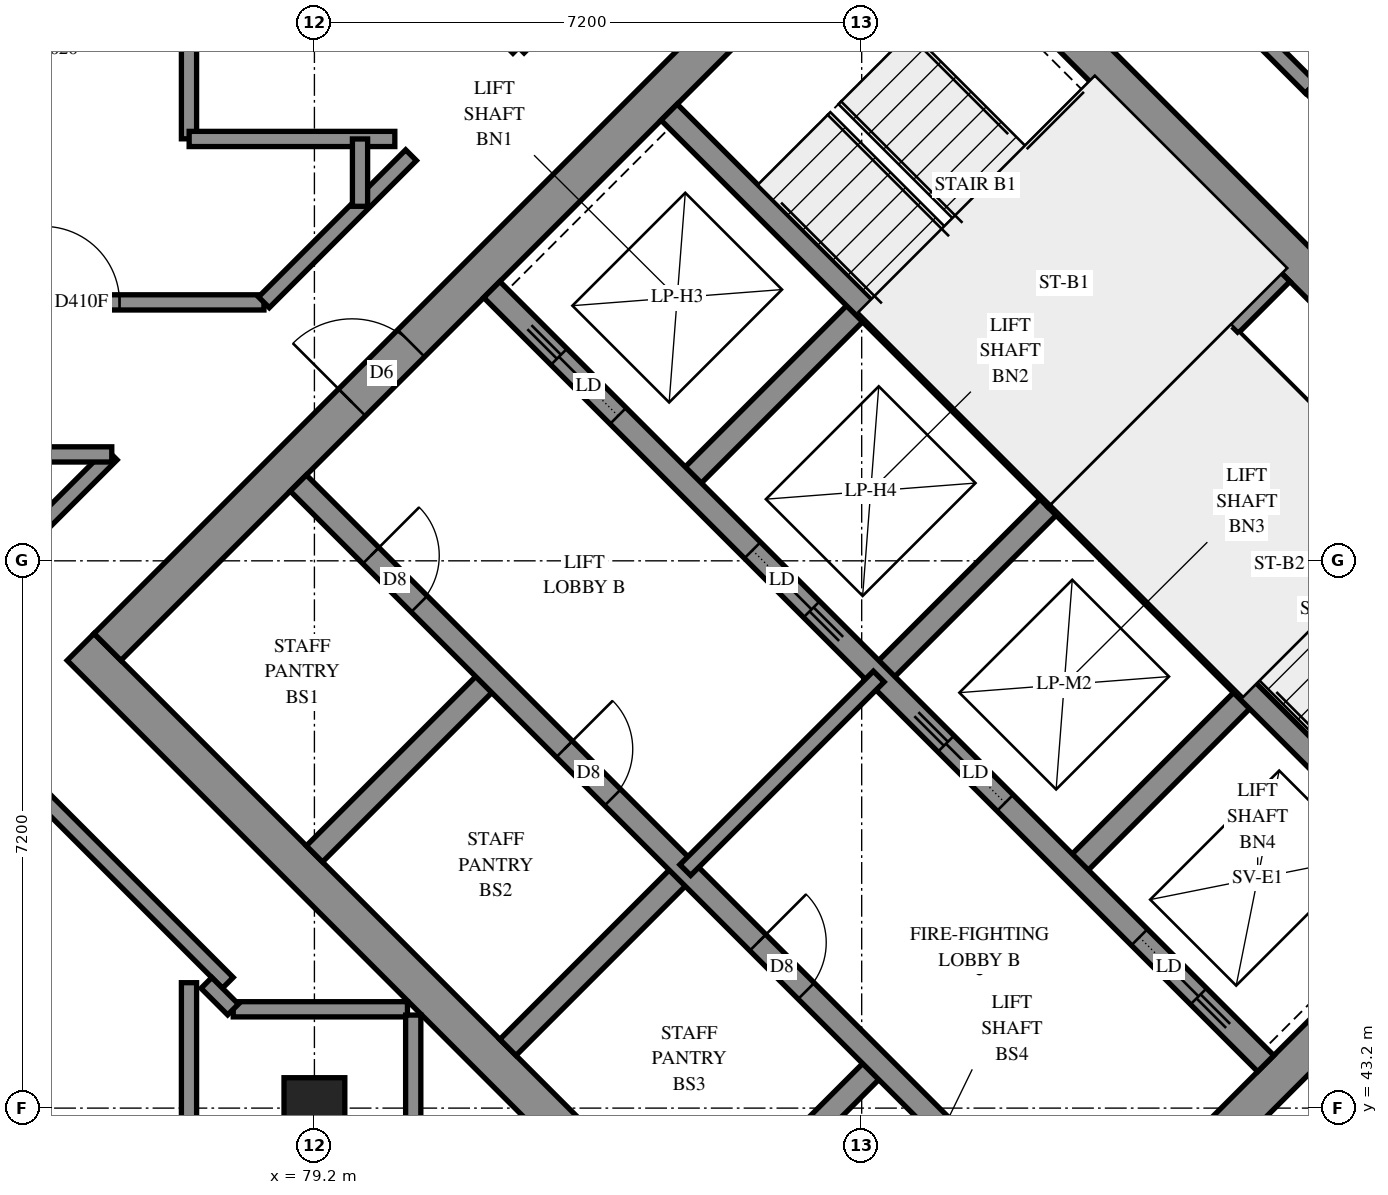
"""IFC4 building model, lengths in metres.
Left out: names, types, materials, properties, quantities, classifications, styles, units other than length and angle.
Written with IfcOpenShell. Run it as: python <this file> out.ifc"""

import sys

from ifc_helpers import new_model, si_unit, direction, frame, frame_2d, origin, origin_2d, place, context, subcontext, project, spatial, rectangle, extrude, element, fill, save


model = new_model("IFC4")
c1 = context("Model", 3, precision=1e-05, world=origin(), true_north=direction((0.0, 1.0)))
c2 = subcontext(c1, "Body", "Model", "MODEL_VIEW")
j1 = project(units=[si_unit("LENGTHUNIT", "METRE"), si_unit("PLANEANGLEUNIT", "RADIAN")], contexts=[c1])
p1 = place(None, origin())
s1 = spatial("IfcSite", under=j1, at=p1, CompositionType="ELEMENT")
p2 = place(p1, origin())
s2 = spatial("IfcBuilding", under=s1, at=p2, CompositionType="ELEMENT")
p3 = place(p2, frame((0.0, 0.0, 227.0)))
s3 = spatial("IfcBuildingStorey", under=s2, at=p3, CompositionType="ELEMENT", Elevation=227.0)
p4 = place(p3, frame((79.2, 43.2, 0.0), z_axis=(0.0, 0.0, 1.0), x_axis=(1.0, 0.0, 0.0)))
e1 = element("IfcColumn", 1, at=p4, inside=s3, PredefinedType="COLUMN", context=c2, shape_type="SweptSolid", body=[
    extrude(rectangle(XDim=0.8, YDim=0.8, at=origin_2d()), origin(), (0.0, 0.0, 1.0), 3.1),
])
p5 = place(p3, frame((76.124, 49.267, -0.3), z_axis=(0.0, 0.0, 1.0), x_axis=(0.7071067812, -0.7071067812, 0.0)))
e2 = element("IfcWall", 2, at=p5, inside=s3, PredefinedType="SHEAR", context=c2, shape_type="SweptSolid", body=[
    extrude(rectangle(XDim=15.4, YDim=0.5, at=frame_2d((7.7, 0.0))), origin(), (0.0, 0.0, 1.0), 2.7),
])
p6 = place(p3, frame((86.66, 59.802, -0.3), z_axis=(0.0, 0.0, 1.0), x_axis=(0.7071067812, -0.7071067812, 0.0)))
e3 = element("IfcWall", 3, at=p6, inside=s3, PredefinedType="SHEAR", context=c2, shape_type="SweptSolid", body=[
    extrude(rectangle(XDim=15.4, YDim=0.5, at=frame_2d((7.7, 0.0))), origin(), (0.0, 0.0, 1.0), 2.7),
])
p7 = place(p6, frame((10.5, 0.0, 0.3)))
e4 = element("IfcOpeningElement", 4, at=p7, cuts=e3, PredefinedType="OPENING", context=c2, shape_type="SweptSolid", body=[
    extrude(rectangle(XDim=0.8, YDim=2.1, at=frame_2d((0.4, 1.05))), frame((0.0, 0.26, 0.0), z_axis=(0.0, -1.0, 0.0), x_axis=(1.0, 0.0, 0.0)), (0.0, 0.0, 1.0), 0.52),
])
p8 = place(p3, frame((76.478, 49.267, -0.3), z_axis=(0.0, 0.0, 1.0), x_axis=(0.7071067812, 0.7071067812, 0.0)))
e5 = element("IfcWall", 5, at=p8, inside=s3, PredefinedType="SHEAR", context=c2, shape_type="SweptSolid", body=[
    extrude(rectangle(XDim=14.4, YDim=0.5, at=frame_2d((7.2, 0.0))), origin(), (0.0, 0.0, 1.0), 2.7),
])
p9 = place(p8, frame((4.55, 0.0, 0.3)))
e6 = element("IfcOpeningElement", 6, at=p9, cuts=e5, PredefinedType="OPENING", context=c2, shape_type="SweptSolid", body=[
    extrude(rectangle(XDim=1.1, YDim=2.1, at=frame_2d((0.55, 1.05))), frame((0.0, 0.26, 0.0), z_axis=(0.0, -1.0, 0.0), x_axis=(1.0, 0.0, 0.0)), (0.0, 0.0, 1.0), 0.52),
])
p10 = place(p8, frame((11.35, 0.0, 0.3)))
e7 = element("IfcOpeningElement", 7, at=p10, cuts=e5, PredefinedType="OPENING", context=c2, shape_type="SweptSolid", body=[
    extrude(rectangle(XDim=1.1, YDim=2.1, at=frame_2d((0.55, 1.05))), frame((0.0, 0.26, 0.0), z_axis=(0.0, -1.0, 0.0), x_axis=(1.0, 0.0, 0.0)), (0.0, 0.0, 1.0), 0.52),
])
p11 = place(p3, frame((87.013, 38.731, -0.3), z_axis=(0.0, 0.0, 1.0), x_axis=(0.7071067812, 0.7071067812, 0.0)))
e8 = element("IfcWall", 8, at=p11, inside=s3, PredefinedType="SHEAR", context=c2, shape_type="SweptSolid", body=[
    extrude(rectangle(XDim=14.4, YDim=0.5, at=frame_2d((7.2, 0.0))), origin(), (0.0, 0.0, 1.0), 2.7),
])
p12 = place(p11, frame((4.55, 0.0, 0.3)))
e9 = element("IfcOpeningElement", 9, at=p12, cuts=e8, PredefinedType="OPENING", context=c2, shape_type="SweptSolid", body=[
    extrude(rectangle(XDim=1.1, YDim=2.1, at=frame_2d((0.55, 1.05))), frame((0.0, 0.26, 0.0), z_axis=(0.0, -1.0, 0.0), x_axis=(1.0, 0.0, 0.0)), (0.0, 0.0, 1.0), 0.52),
])
p13 = place(p11, frame((11.35, 0.0, 0.3)))
e10 = element("IfcOpeningElement", 10, at=p13, cuts=e8, PredefinedType="OPENING", context=c2, shape_type="SweptSolid", body=[
    extrude(rectangle(XDim=1.1, YDim=2.1, at=frame_2d((0.55, 1.05))), frame((0.0, 0.26, 0.0), z_axis=(0.0, -1.0, 0.0), x_axis=(1.0, 0.0, 0.0)), (0.0, 0.0, 1.0), 0.52),
])
for number, where, z_axis, x_axis in (
    (11, (79.2, 46.544, 0.0), (0.0, 0.0, 1.0), (0.707, 0.707, 0.0)),
    (12, (84.079, 51.423, 0.0), (0.0, 0.0, 1.0), (0.707, 0.707, 0.0)),
):
    element("IfcWall", number, at=place(p3, frame(where, z_axis=z_axis, x_axis=x_axis)), inside=s3, PredefinedType="SOLIDWALL", context=c2, shape_type="SweptSolid", body=[
        extrude(rectangle(XDim=3.3, YDim=0.3, at=frame_2d((1.65, 0.0))), origin(), (0.0, 0.0, 1.0), 3.1),
    ])
p14 = place(p3, frame((81.746, 43.999, 0.0), z_axis=(0.0, 0.0, 1.0), x_axis=(0.7071067812, 0.7071067812, 0.0)))
e13 = element("IfcWall", 13, at=p14, inside=s3, PredefinedType="SOLIDWALL", context=c2, shape_type="SweptSolid", body=[
    extrude(rectangle(XDim=3.3, YDim=0.3, at=frame_2d((1.65, 0.0))), origin(), (0.0, 0.0, 1.0), 3.1),
])
p15 = place(p3, frame((86.625, 48.878, 0.0), z_axis=(0.0, 0.0, 1.0), x_axis=(0.7071067812, 0.7071067812, 0.0)))
e14 = element("IfcWall", 14, at=p15, inside=s3, PredefinedType="SOLIDWALL", context=c2, shape_type="SweptSolid", body=[
    extrude(rectangle(XDim=3.3, YDim=0.3, at=frame_2d((1.65, 0.0))), origin(), (0.0, 0.0, 1.0), 3.1),
])
p16 = place(p3, frame((84.291, 41.453, 0.0), z_axis=(0.0, 0.0, 1.0), x_axis=(0.7071067812, 0.7071067812, 0.0)))
e15 = element("IfcWall", 15, at=p16, inside=s3, PredefinedType="SOLIDWALL", context=c2, shape_type="SweptSolid", body=[
    extrude(rectangle(XDim=3.3, YDim=0.3, at=frame_2d((1.65, 0.0))), origin(), (0.0, 0.0, 1.0), 3.1),
])
p17 = place(p3, frame((89.17, 46.332, 0.0), z_axis=(0.0, 0.0, 1.0), x_axis=(0.7071067812, 0.7071067812, 0.0)))
e16 = element("IfcWall", 16, at=p17, inside=s3, PredefinedType="SOLIDWALL", context=c2, shape_type="SweptSolid", body=[
    extrude(rectangle(XDim=3.3, YDim=0.3, at=frame_2d((1.65, 0.0))), origin(), (0.0, 0.0, 1.0), 3.1),
])
p18 = place(p3, frame((78.988, 51.423, 0.0), z_axis=(0.0, 0.0, 1.0), x_axis=(0.7071067812, -0.7071067812, 0.0)))
e17 = element("IfcWall", 17, at=p18, inside=s3, PredefinedType="SOLIDWALL", context=c2, shape_type="SweptSolid", body=[
    extrude(rectangle(XDim=14.4, YDim=0.3, at=frame_2d((7.2, 0.0))), origin(), (0.0, 0.0, 1.0), 3.1),
])
p19 = place(p18, frame((1.35, 0.0, 0.0)))
e18 = element("IfcOpeningElement", 18, at=p19, cuts=e17, PredefinedType="OPENING", context=c2, shape_type="SweptSolid", body=[
    extrude(rectangle(XDim=0.9, YDim=2.1, at=frame_2d((0.45, 1.05))), frame((0.0, 0.16, 0.0), z_axis=(0.0, -1.0, 0.0), x_axis=(1.0, 0.0, 0.0)), (0.0, 0.0, 1.0), 0.32),
])
p20 = place(p18, frame((4.95, 0.0, 0.0)))
e19 = element("IfcOpeningElement", 19, at=p20, cuts=e17, PredefinedType="OPENING", context=c2, shape_type="SweptSolid", body=[
    extrude(rectangle(XDim=0.9, YDim=2.1, at=frame_2d((0.45, 1.05))), frame((0.0, 0.16, 0.0), z_axis=(0.0, -1.0, 0.0), x_axis=(1.0, 0.0, 0.0)), (0.0, 0.0, 1.0), 0.32),
])
p21 = place(p18, frame((8.55, 0.0, 0.0)))
e20 = element("IfcOpeningElement", 20, at=p21, cuts=e17, PredefinedType="OPENING", context=c2, shape_type="SweptSolid", body=[
    extrude(rectangle(XDim=0.9, YDim=2.1, at=frame_2d((0.45, 1.05))), frame((0.0, 0.16, 0.0), z_axis=(0.0, -1.0, 0.0), x_axis=(1.0, 0.0, 0.0)), (0.0, 0.0, 1.0), 0.32),
])
p22 = place(p18, frame((12.05, 0.0, 0.0)))
e21 = element("IfcOpeningElement", 21, at=p22, cuts=e17, PredefinedType="OPENING", context=c2, shape_type="SweptSolid", body=[
    extrude(rectangle(XDim=1.1, YDim=2.1, at=frame_2d((0.55, 1.05))), frame((0.0, 0.16, 0.0), z_axis=(0.0, -1.0, 0.0), x_axis=(1.0, 0.0, 0.0)), (0.0, 0.0, 1.0), 0.32),
])
p23 = place(p3, frame((81.534, 53.969, 0.0), z_axis=(0.0, 0.0, 1.0), x_axis=(0.707103309, -0.7071102534, 0.0)))
e22 = element("IfcWall", 22, at=p23, inside=s3, PredefinedType="SOLIDWALL", context=c2, shape_type="SweptSolid", body=[
    extrude(rectangle(XDim=14.4, YDim=0.3, at=frame_2d((7.2, 0.0))), origin(), (0.0, 0.0, 1.0), 3.1),
])
p24 = place(p23, frame((1.25, 0.0, 0.0)))
e23 = element("IfcOpeningElement", 23, at=p24, cuts=e22, PredefinedType="OPENING", context=c2, shape_type="SweptSolid", body=[
    extrude(rectangle(XDim=1.1, YDim=2.1, at=frame_2d((0.55, 1.05))), frame((0.0, 0.16, 0.0), z_axis=(0.0, -1.0, 0.0), x_axis=(1.0, 0.0, 0.0)), (0.0, 0.0, 1.0), 0.32),
])
p25 = place(p23, frame((4.85, 0.0, 0.0)))
e24 = element("IfcOpeningElement", 24, at=p25, cuts=e22, PredefinedType="OPENING", context=c2, shape_type="SweptSolid", body=[
    extrude(rectangle(XDim=1.1, YDim=2.1, at=frame_2d((0.55, 1.05))), frame((0.0, 0.16, 0.0), z_axis=(0.0, -1.0, 0.0), x_axis=(1.0, 0.0, 0.0)), (0.0, 0.0, 1.0), 0.32),
])
p26 = place(p23, frame((8.45, 0.0, 0.0)))
e25 = element("IfcOpeningElement", 25, at=p26, cuts=e22, PredefinedType="OPENING", context=c2, shape_type="SweptSolid", body=[
    extrude(rectangle(XDim=1.1, YDim=2.1, at=frame_2d((0.55, 1.05))), frame((0.0, 0.16, 0.0), z_axis=(0.0, -1.0, 0.0), x_axis=(1.0, 0.0, 0.0)), (0.0, 0.0, 1.0), 0.32),
])
p27 = place(p23, frame((12.05, 0.0, 0.0)))
e26 = element("IfcOpeningElement", 26, at=p27, cuts=e22, PredefinedType="OPENING", context=c2, shape_type="SweptSolid", body=[
    extrude(rectangle(XDim=1.1, YDim=2.1, at=frame_2d((0.55, 1.05))), frame((0.0, 0.16, 0.0), z_axis=(0.0, -1.0, 0.0), x_axis=(1.0, 0.0, 0.0)), (0.0, 0.0, 1.0), 0.32),
])
for number, where, z_axis, x_axis in (
    (27, (83.867, 56.302, 0.0), (0.0, 0.0, 1.0), (0.707, -0.707, 0.0)),
    (28, (88.958, 51.211, 0.0), (0.0, 0.0, 1.0), (0.707, -0.707, 0.0)),
):
    element("IfcWall", number, at=place(p3, frame(where, z_axis=z_axis, x_axis=x_axis)), inside=s3, PredefinedType="SOLIDWALL", context=c2, shape_type="SweptSolid", body=[
        extrude(rectangle(XDim=7.2, YDim=0.3, at=frame_2d((3.6, 0.0))), origin(), (0.0, 0.0, 1.0), 3.1),
    ])
p28 = place(p3, frame((88.958, 51.211, 0.0), z_axis=(0.0, 0.0, 1.0), x_axis=(0.7071067812, 0.7071067812, 0.0)))
e29 = element("IfcWall", 29, at=p28, inside=s3, PredefinedType="SOLIDWALL", context=c2, shape_type="SweptSolid", body=[
    extrude(rectangle(XDim=4.2, YDim=0.3, at=frame_2d((2.1, 0.0))), origin(), (0.0, 0.0, 1.0), 3.1),
])
p29 = place(p3, frame((91.313, 53.354, 0.0), z_axis=(0.0, 0.0, 1.0), x_axis=(0.7071067812, -0.7071067812, 0.0)))
e30 = element("IfcWall", 30, at=p29, inside=s3, PredefinedType="PARTITIONING", context=c2, shape_type="SweptSolid", body=[
    extrude(rectangle(XDim=5.95, YDim=0.15, at=frame_2d((2.975, 0.0))), origin(), (0.0, 0.0, 1.0), 3.1),
])
p30 = place(p3, frame((84.079, 46.332, 0.0), z_axis=(0.0, 0.0, 1.0), x_axis=(0.7071067812, 0.7071067812, 0.0)))
e31 = element("IfcWall", 31, at=p30, inside=s3, PredefinedType="PARTITIONING", context=c2, shape_type="SweptSolid", body=[
    extrude(rectangle(XDim=3.6, YDim=0.2, at=frame_2d((1.8, 0.0))), origin(), (0.0, 0.0, 1.0), 3.1),
])
p31 = place(p3, frame((81.887, 57.153, 0.0), z_axis=(0.0, 0.0, 1.0), x_axis=(0.7071067812, 0.7071067812, 0.0)))
e32 = element("IfcWall", 32, at=p31, inside=s3, PredefinedType="PARTITIONING", context=c2, shape_type="SweptSolid", body=[
    extrude(rectangle(XDim=6.997, YDim=0.2, at=frame_2d((3.499, 0.0))), origin(), (0.0, 0.0, 1.0), 3.1),
])
p32 = place(p31, frame((0.136, 0.0, 0.0)))
e33 = element("IfcOpeningElement", 33, at=p32, cuts=e32, PredefinedType="OPENING", context=c2, shape_type="SweptSolid", body=[
    extrude(rectangle(XDim=1.0, YDim=2.1, at=frame_2d((0.5, 1.05))), frame((0.0, 0.11, 0.0), z_axis=(0.0, -1.0, 0.0), x_axis=(1.0, 0.0, 0.0)), (0.0, 0.0, 1.0), 0.22),
])
p33 = place(p3, frame((73.999, 48.911, 0.0), z_axis=(0.0, 0.0, 1.0), x_axis=(0.7071067812, -0.7071067812, 0.0)))
e34 = element("IfcWall", 34, at=p33, inside=s3, PredefinedType="PARTITIONING", context=c2, shape_type="SweptSolid", body=[
    extrude(rectangle(XDim=5.745, YDim=0.2, at=frame_2d((2.872, 0.0))), origin(), (0.0, 0.0, 1.0), 3.1),
])
p34 = place(p33, frame((0.724, 0.0, 0.0)))
e35 = element("IfcOpeningElement", 35, at=p34, cuts=e34, PredefinedType="OPENING", context=c2, shape_type="SweptSolid", body=[
    extrude(rectangle(XDim=1.0, YDim=2.1, at=frame_2d((0.5, 1.05))), frame((0.0, 0.11, 0.0), z_axis=(0.0, -1.0, 0.0), x_axis=(1.0, 0.0, 0.0)), (0.0, 0.0, 1.0), 0.22),
])
p35 = place(p3, frame((88.247, 60.683, 0.0), z_axis=(0.0, 0.0, 1.0), x_axis=(0.7071067812, -0.7071067812, 0.0)))
e36 = element("IfcWall", 36, at=p35, inside=s3, PredefinedType="PARTITIONING", context=c2, shape_type="SweptSolid", body=[
    extrude(rectangle(XDim=5.742, YDim=0.2, at=frame_2d((2.871, 0.0))), origin(), (0.0, 0.0, 1.0), 3.1),
])
p36 = place(p35, frame((4.069, 0.0, 0.0)))
e37 = element("IfcOpeningElement", 37, at=p36, cuts=e36, PredefinedType="OPENING", context=c2, shape_type="SweptSolid", body=[
    extrude(rectangle(XDim=0.9, YDim=2.1, at=frame_2d((0.45, 1.05))), frame((0.0, 0.11, 0.0), z_axis=(0.0, -1.0, 0.0), x_axis=(1.0, 0.0, 0.0)), (0.0, 0.0, 1.0), 0.22),
])
p37 = place(p3, frame((74.002, 53.8, 0.0), z_axis=(0.0, 0.0, 1.0), x_axis=(1.0, 0.0, 0.0)))
e38 = element("IfcWall", 38, at=p37, inside=s3, PredefinedType="PARTITIONING", context=c2, shape_type="SweptSolid", body=[
    extrude(rectangle(XDim=4.534, YDim=0.2, at=frame_2d((2.267, 0.0))), origin(), (0.0, 0.0, 1.0), 3.1),
])
p38 = place(p37, frame((1.634, 0.0, 0.0)))
e39 = element("IfcOpeningElement", 39, at=p38, cuts=e38, PredefinedType="OPENING", context=c2, shape_type="SweptSolid", body=[
    extrude(rectangle(XDim=1.0, YDim=2.1, at=frame_2d((0.5, 1.05))), frame((0.0, 0.11, 0.0), z_axis=(0.0, -1.0, 0.0), x_axis=(1.0, 0.0, 0.0)), (0.0, 0.0, 1.0), 0.22),
])
p39 = place(p3, frame((74.001, 49.267, 0.0), z_axis=(0.0, 0.0, 1.0), x_axis=(0.7071067812, 0.7071067812, 0.0)))
e40 = element("IfcWall", 40, at=p39, inside=s3, PredefinedType="PARTITIONING", context=c2, shape_type="SweptSolid", body=[
    extrude(rectangle(XDim=3.581, YDim=0.2, at=frame_2d((1.79, 0.0))), origin(), (0.0, 0.0, 1.0), 3.1),
])
p40 = place(p3, frame((77.55, 41.513, 0.0), z_axis=(0.0, 0.0, 1.0), x_axis=(0.0, 1.0, 0.0)))
e41 = element("IfcWall", 41, at=p40, inside=s3, PredefinedType="PARTITIONING", context=c2, shape_type="SweptSolid", body=[
    extrude(rectangle(XDim=3.337, YDim=0.2, at=frame_2d((1.669, 0.0))), origin(), (0.0, 0.0, 1.0), 3.1),
])
p41 = place(p3, frame((78.535, 53.801, 0.0), z_axis=(0.0, 0.0, 1.0), x_axis=(0.7071067812, 0.7071067812, 0.0)))
e42 = element("IfcWall", 42, at=p41, inside=s3, PredefinedType="PARTITIONING", context=c2, shape_type="SweptSolid", body=[
    extrude(rectangle(XDim=2.738, YDim=0.2, at=frame_2d((1.369, 0.0))), origin(), (0.0, 0.0, 1.0), 3.1),
])
for number, where, z_axis, x_axis in (
    (43, (77.55, 55.952, 0.0), (0.0, 0.0, 1.0), (0.0, 1.0, 0.0)),
    (44, (77.552, 55.95, 0.0), (0.0, 0.0, 1.0), (1.0, 0.0, 0.0)),
):
    element("IfcWall", number, at=place(p3, frame(where, z_axis=z_axis, x_axis=x_axis)), inside=s3, PredefinedType="PARTITIONING", context=c2, shape_type="SweptSolid", body=[
        extrude(rectangle(XDim=2.706, YDim=0.2, at=frame_2d((1.353, 0.0))), origin(), (0.0, 0.0, 1.0), 3.1),
    ])
p42 = place(p3, frame((74.002, 51.8, 0.0), z_axis=(0.0, 0.0, 1.0), x_axis=(1.0, 0.0, 0.0)))
e45 = element("IfcWall", 45, at=p42, inside=s3, PredefinedType="PARTITIONING", context=c2, shape_type="SweptSolid", body=[
    extrude(rectangle(XDim=2.532, YDim=0.2, at=frame_2d((1.266, 0.0))), origin(), (0.0, 0.0, 1.0), 3.1),
])
for number, where, z_axis, x_axis in (
    (46, (78.132, 44.5, 0.0), (0.0, 0.0, 1.0), (1.0, 0.0, 0.0)),
    (47, (80.5, 42.132, 0.0), (0.0, 0.0, 1.0), (0.0, 1.0, 0.0)),
):
    element("IfcWall", number, at=place(p3, frame(where, z_axis=z_axis, x_axis=x_axis)), inside=s3, PredefinedType="PARTITIONING", context=c2, shape_type="SweptSolid", body=[
        extrude(rectangle(XDim=2.292, YDim=0.2, at=frame_2d((1.146, 0.0))), origin(), (0.0, 0.0, 1.0), 3.1),
    ])
p43 = place(p3, frame((80.847, 58.185, 0.0), z_axis=(0.0, 0.0, 1.0), x_axis=(0.7071067812, -0.7071067812, 0.0)))
e48 = element("IfcWall", 48, at=p43, inside=s3, PredefinedType="PARTITIONING", context=c2, shape_type="SweptSolid", body=[
    extrude(rectangle(XDim=1.465, YDim=0.2, at=frame_2d((0.733, 0.0))), origin(), (0.0, 0.0, 1.0), 3.1),
])
p44 = place(p3, frame((92.311, 56.627, 0.0), z_axis=(0.0, 0.0, 1.0), x_axis=(0.7077922938, -0.7064206033, 0.0)))
e49 = element("IfcWall", 49, at=p44, inside=s3, PredefinedType="PARTITIONING", context=c2, shape_type="SweptSolid", body=[
    extrude(rectangle(XDim=1.458, YDim=0.2, at=frame_2d((0.729, 0.0))), origin(), (0.0, 0.0, 1.0), 3.1),
])
p45 = place(p3, frame((79.8, 55.064, 0.0), z_axis=(0.0, 0.0, 1.0), x_axis=(0.0, 1.0, 0.0)))
e50 = element("IfcWall", 50, at=p45, inside=s3, PredefinedType="PARTITIONING", context=c2, shape_type="SweptSolid", body=[
    extrude(rectangle(XDim=0.886, YDim=0.2, at=frame_2d((0.443, 0.0))), origin(), (0.0, 0.0, 1.0), 3.1),
])
p46 = place(p3, frame((77.779, 44.847, 0.0), z_axis=(0.0, 0.0, 1.0), x_axis=(0.7071067812, -0.7071067812, 0.0)))
e51 = element("IfcWall", 51, at=p46, inside=s3, PredefinedType="PARTITIONING", context=c2, shape_type="SweptSolid", body=[
    extrude(rectangle(XDim=0.495, YDim=0.2, at=frame_2d((0.247, 0.0))), origin(), (0.0, 0.0, 1.0), 3.1),
])
p47 = place(p9, origin())
e52 = element("IfcDoor", 52, at=p47, inside=s3, OperationType="DOUBLE_DOOR_SINGLE_SWING", PredefinedType="DOOR", context=c2, shape_type="SweptSolid", body=[
    extrude(rectangle(XDim=1.1, YDim=2.1, at=frame_2d((0.55, 1.05))), frame((0.0, 0.025, 0.0), z_axis=(0.0, -1.0, 0.0), x_axis=(1.0, 0.0, 0.0)), (0.0, 0.0, 1.0), 0.05),
])
fill(e6, e52)
p48 = place(p19, origin())
e53 = element("IfcDoor", 53, at=p48, inside=s3, OperationType="SINGLE_SWING_LEFT", PredefinedType="DOOR", context=c2, shape_type="SweptSolid", body=[
    extrude(rectangle(XDim=0.9, YDim=2.1, at=frame_2d((0.45, 1.05))), frame((0.0, 0.025, 0.0), z_axis=(0.0, -1.0, 0.0), x_axis=(1.0, 0.0, 0.0)), (0.0, 0.0, 1.0), 0.05),
])
fill(e18, e53)
p49 = place(p20, origin())
e54 = element("IfcDoor", 54, at=p49, inside=s3, OperationType="SINGLE_SWING_LEFT", PredefinedType="DOOR", context=c2, shape_type="SweptSolid", body=[
    extrude(rectangle(XDim=0.9, YDim=2.1, at=frame_2d((0.45, 1.05))), frame((0.0, 0.025, 0.0), z_axis=(0.0, -1.0, 0.0), x_axis=(1.0, 0.0, 0.0)), (0.0, 0.0, 1.0), 0.05),
])
fill(e19, e54)
p50 = place(p21, origin())
e55 = element("IfcDoor", 55, at=p50, inside=s3, OperationType="SINGLE_SWING_LEFT", PredefinedType="DOOR", context=c2, shape_type="SweptSolid", body=[
    extrude(rectangle(XDim=0.9, YDim=2.1, at=frame_2d((0.45, 1.05))), frame((0.0, 0.025, 0.0), z_axis=(0.0, -1.0, 0.0), x_axis=(1.0, 0.0, 0.0)), (0.0, 0.0, 1.0), 0.05),
])
fill(e20, e55)
p51 = place(p24, origin())
e56 = element("IfcDoor", 56, at=p51, inside=s3, OperationType="SLIDING_TO_LEFT", PredefinedType="DOOR", context=c2, shape_type="SweptSolid", body=[
    extrude(rectangle(XDim=1.1, YDim=2.1, at=frame_2d((0.55, 1.05))), frame((0.0, 0.025, 0.0), z_axis=(0.0, -1.0, 0.0), x_axis=(1.0, 0.0, 0.0)), (0.0, 0.0, 1.0), 0.05),
])
fill(e23, e56)
p52 = place(p25, origin())
e57 = element("IfcDoor", 57, at=p52, inside=s3, OperationType="SLIDING_TO_RIGHT", PredefinedType="DOOR", context=c2, shape_type="SweptSolid", body=[
    extrude(rectangle(XDim=1.1, YDim=2.1, at=frame_2d((0.55, 1.05))), frame((0.0, 0.025, 0.0), z_axis=(0.0, -1.0, 0.0), x_axis=(1.0, 0.0, 0.0)), (0.0, 0.0, 1.0), 0.05),
])
fill(e24, e57)
p53 = place(p26, origin())
e58 = element("IfcDoor", 58, at=p53, inside=s3, OperationType="SLIDING_TO_LEFT", PredefinedType="DOOR", context=c2, shape_type="SweptSolid", body=[
    extrude(rectangle(XDim=1.1, YDim=2.1, at=frame_2d((0.55, 1.05))), frame((0.0, 0.025, 0.0), z_axis=(0.0, -1.0, 0.0), x_axis=(1.0, 0.0, 0.0)), (0.0, 0.0, 1.0), 0.05),
])
fill(e25, e58)
p54 = place(p27, origin())
e59 = element("IfcDoor", 59, at=p54, inside=s3, OperationType="SLIDING_TO_RIGHT", PredefinedType="DOOR", context=c2, shape_type="SweptSolid", body=[
    extrude(rectangle(XDim=1.1, YDim=2.1, at=frame_2d((0.55, 1.05))), frame((0.0, 0.025, 0.0), z_axis=(0.0, -1.0, 0.0), x_axis=(1.0, 0.0, 0.0)), (0.0, 0.0, 1.0), 0.05),
])
fill(e26, e59)
p55 = place(p38, origin())
e60 = element("IfcDoor", 60, at=p55, inside=s3, OperationType="SINGLE_SWING_LEFT", PredefinedType="DOOR", context=c2, shape_type="SweptSolid", body=[
    extrude(rectangle(XDim=1.0, YDim=2.1, at=frame_2d((0.5, 1.05))), frame((0.0, 0.025, 0.0), z_axis=(0.0, -1.0, 0.0), x_axis=(1.0, 0.0, 0.0)), (0.0, 0.0, 1.0), 0.05),
])
fill(e39, e60)
save(model, sys.argv[1])
